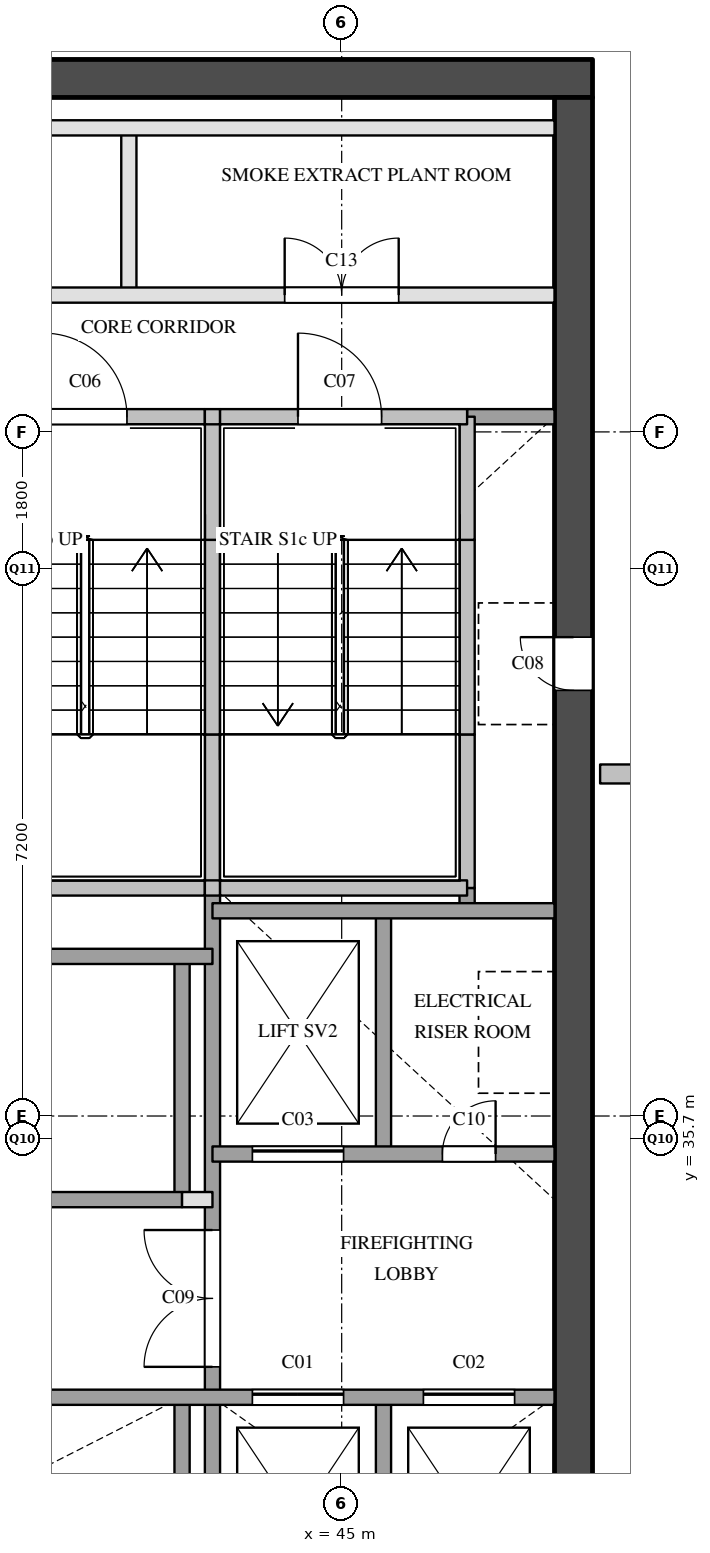
"""IFC4 building model, lengths in metres.
Left out: names, types, materials, properties, quantities, classifications, styles, units other than length and angle.
Written with IfcOpenShell. Run it as: python <this file> out.ifc"""

import sys

from ifc_helpers import new_model, si_unit, direction, frame, frame_2d, origin, place, context, subcontext, project, spatial, rectangle, extrude, element, fill, save


model = new_model("IFC4")
c1 = context("Model", 3, precision=1e-05, world=origin(), true_north=direction((0.0, 1.0)))
c2 = subcontext(c1, "Body", "Model", "MODEL_VIEW")
j1 = project(units=[si_unit("LENGTHUNIT", "METRE"), si_unit("PLANEANGLEUNIT", "RADIAN")], contexts=[c1])
p1 = place(None, origin())
s1 = spatial("IfcSite", under=j1, at=p1, CompositionType="ELEMENT")
p2 = place(p1, origin())
s2 = spatial("IfcBuilding", under=s1, at=p2, CompositionType="ELEMENT")
p3 = place(p2, frame((0.0, 0.0, 197.3)))
s3 = spatial("IfcBuildingStorey", under=s2, at=p3, CompositionType="ELEMENT", Elevation=197.3)
p4 = place(p3, frame((36.1, 49.65, 0.0), z_axis=(0.0, 0.0, 1.0), x_axis=(1.0, 0.0, 0.0)))
e1 = element("IfcWall", 1, at=p4, inside=s3, PredefinedType="SHEAR", context=c2, shape_type="SweptSolid", body=[
    extrude(rectangle(XDim=12.2, YDim=0.5, at=frame_2d((6.1, 0.0))), origin(), (0.0, 0.0, 1.0), 5.7),
])
p5 = place(p3, frame((48.05, 29.1, 0.0), z_axis=(0.0, 0.0, 1.0), x_axis=(0.0, 1.0, 0.0)))
e2 = element("IfcWall", 2, at=p5, inside=s3, PredefinedType="SHEAR", context=c2, shape_type="SweptSolid", body=[
    extrude(rectangle(XDim=20.3, YDim=0.5, at=frame_2d((10.15, 0.0))), origin(), (0.0, 0.0, 1.0), 5.7),
])
p6 = place(p5, frame((12.5, 0.0, 0.0)))
e3 = element("IfcOpeningElement", 3, at=p6, cuts=e2, PredefinedType="OPENING", context=c2, shape_type="SweptSolid", body=[
    extrude(rectangle(XDim=0.7, YDim=2.1, at=frame_2d((0.35, 1.05))), frame((0.0, 0.26, 0.0), z_axis=(0.0, -1.0, 0.0), x_axis=(1.0, 0.0, 0.0)), (0.0, 0.0, 1.0), 0.52),
])
p7 = place(p3, frame((42.2, 46.8, 0.0), z_axis=(0.0, 0.0, 1.0), x_axis=(0.0, 1.0, 0.0)))
e4 = element("IfcWall", 4, at=p7, inside=s3, PredefinedType="PARTITIONING", context=c2, shape_type="SweptSolid", body=[
    extrude(rectangle(XDim=2.2, YDim=0.2, at=frame_2d((1.1, 0.0))), origin(), (0.0, 0.0, 1.0), 5.7),
])
p8 = place(p3, frame((42.9, 29.1, 0.0), z_axis=(0.0, 0.0, 1.0), x_axis=(0.0, 1.0, 0.0)))
e5 = element("IfcWall", 5, at=p8, inside=s3, PredefinedType="SOLIDWALL", context=c2, shape_type="SweptSolid", body=[
    extrude(rectangle(XDim=3.2, YDim=0.2, at=frame_2d((1.6, 0.0))), origin(), (0.0, 0.0, 1.0), 5.7),
])
p9 = place(p3, frame((42.9, 34.9, 0.0), z_axis=(0.0, 0.0, 1.0), x_axis=(0.0, 1.0, 0.0)))
e6 = element("IfcWall", 6, at=p9, inside=s3, PredefinedType="SOLIDWALL", context=c2, shape_type="SweptSolid", body=[
    extrude(rectangle(XDim=3.2, YDim=0.2, at=frame_2d((1.6, 0.0))), origin(), (0.0, 0.0, 1.0), 5.7),
])
p10 = place(p3, frame((43.3, 29.1, 0.0), z_axis=(0.0, 0.0, 1.0), x_axis=(0.0, 1.0, 0.0)))
e7 = element("IfcWall", 7, at=p10, inside=s3, PredefinedType="SOLIDWALL", context=c2, shape_type="SweptSolid", body=[
    extrude(rectangle(XDim=9.9, YDim=0.2, at=frame_2d((4.95, 0.0))), origin(), (0.0, 0.0, 1.0), 5.7),
])
p11 = place(p10, frame((3.6, 0.0, 0.0)))
e8 = element("IfcOpeningElement", 8, at=p11, cuts=e7, PredefinedType="OPENING", context=c2, shape_type="SweptSolid", body=[
    extrude(rectangle(XDim=1.8, YDim=2.1, at=frame_2d((0.9, 1.05))), frame((0.0, 0.11, 0.0), z_axis=(0.0, -1.0, 0.0), x_axis=(1.0, 0.0, 0.0)), (0.0, 0.0, 1.0), 0.22),
])
p12 = place(p3, frame((43.3, 39.0, 0.0), z_axis=(0.0, 0.0, 1.0), x_axis=(0.0, 1.0, 0.0)))
e9 = element("IfcWall", 9, at=p12, inside=s3, PredefinedType="SOLIDWALL", context=c2, shape_type="SweptSolid", body=[
    extrude(rectangle(XDim=2.02, YDim=0.2, at=frame_2d((1.01, 0.0))), origin(), (0.0, 0.0, 1.0), 5.7),
])
p13 = place(p3, frame((43.3, 41.02, 0.0), z_axis=(0.0, 0.0, 1.0), x_axis=(0.0, 1.0, 0.0)))
e10 = element("IfcWall", 10, at=p13, inside=s3, PredefinedType="SOLIDWALL", context=c2, shape_type="SweptSolid", body=[
    extrude(rectangle(XDim=2.56, YDim=0.2, at=frame_2d((1.28, 0.0))), origin(), (0.0, 0.0, 1.0), 5.7),
])
p14 = place(p3, frame((43.3, 43.58, 0.0), z_axis=(0.0, 0.0, 1.0), x_axis=(0.0, 1.0, 0.0)))
e11 = element("IfcWall", 11, at=p14, inside=s3, PredefinedType="SOLIDWALL", context=c2, shape_type="SweptSolid", body=[
    extrude(rectangle(XDim=1.62, YDim=0.2, at=frame_2d((0.81, 0.0))), origin(), (0.0, 0.0, 1.0), 5.7),
])
for number, where, z_axis, x_axis in (
    (12, (45.55, 29.1, 0.0), (0.0, 0.0, 1.0), (0.0, 1.0, 0.0)),
    (13, (45.55, 35.5, 0.0), (0.0, 0.0, 1.0), (0.0, 1.0, 0.0)),
):
    element("IfcWall", number, at=place(p3, frame(where, z_axis=z_axis, x_axis=x_axis)), inside=s3, PredefinedType="SOLIDWALL", context=c2, shape_type="SweptSolid", body=[
        extrude(rectangle(XDim=3.2, YDim=0.2, at=frame_2d((1.6, 0.0))), origin(), (0.0, 0.0, 1.0), 5.7),
    ])
p15 = place(p3, frame((46.65, 38.7, 0.0), z_axis=(0.0, 0.0, 1.0), x_axis=(0.0, 1.0, 0.0)))
e14 = element("IfcWall", 14, at=p15, inside=s3, PredefinedType="SOLIDWALL", context=c2, shape_type="SweptSolid", body=[
    extrude(rectangle(XDim=0.3, YDim=0.2, at=frame_2d((0.15, 0.0))), origin(), (0.0, 0.0, 1.0), 5.7),
])
p16 = place(p3, frame((46.65, 39.0, 0.0), z_axis=(0.0, 0.0, 1.0), x_axis=(0.0, 1.0, 0.0)))
e15 = element("IfcWall", 15, at=p16, inside=s3, PredefinedType="SOLIDWALL", context=c2, shape_type="SweptSolid", body=[
    extrude(rectangle(XDim=2.02, YDim=0.2, at=frame_2d((1.01, 0.0))), origin(), (0.0, 0.0, 1.0), 5.7),
])
p17 = place(p3, frame((46.65, 41.02, 0.0), z_axis=(0.0, 0.0, 1.0), x_axis=(0.0, 1.0, 0.0)))
e16 = element("IfcWall", 16, at=p17, inside=s3, PredefinedType="SOLIDWALL", context=c2, shape_type="SweptSolid", body=[
    extrude(rectangle(XDim=2.56, YDim=0.2, at=frame_2d((1.28, 0.0))), origin(), (0.0, 0.0, 1.0), 5.7),
])
p18 = place(p3, frame((46.65, 43.58, 0.0), z_axis=(0.0, 0.0, 1.0), x_axis=(0.0, 1.0, 0.0)))
e17 = element("IfcWall", 17, at=p18, inside=s3, PredefinedType="SOLIDWALL", context=c2, shape_type="SweptSolid", body=[
    extrude(rectangle(XDim=1.62, YDim=0.2, at=frame_2d((0.81, 0.0))), origin(), (0.0, 0.0, 1.0), 5.7),
])
p19 = place(p3, frame((36.6, 32.3, 0.0), z_axis=(0.0, 0.0, 1.0), x_axis=(1.0, 0.0, 0.0)))
e18 = element("IfcWall", 18, at=p19, inside=s3, PredefinedType="SOLIDWALL", context=c2, shape_type="SweptSolid", body=[
    extrude(rectangle(XDim=11.2, YDim=0.2, at=frame_2d((5.6, 0.0))), origin(), (0.0, 0.0, 1.0), 5.7),
])
p20 = place(p19, frame((7.225, 0.0, 0.0)))
e19 = element("IfcOpeningElement", 19, at=p20, cuts=e18, PredefinedType="OPENING", context=c2, shape_type="SweptSolid", body=[
    extrude(rectangle(XDim=1.2, YDim=2.1, at=frame_2d((0.6, 1.05))), frame((0.0, 0.11, 0.0), z_axis=(0.0, -1.0, 0.0), x_axis=(1.0, 0.0, 0.0)), (0.0, 0.0, 1.0), 0.22),
])
p21 = place(p19, frame((9.475, 0.0, 0.0)))
e20 = element("IfcOpeningElement", 20, at=p21, cuts=e18, PredefinedType="OPENING", context=c2, shape_type="SweptSolid", body=[
    extrude(rectangle(XDim=1.2, YDim=2.1, at=frame_2d((0.6, 1.05))), frame((0.0, 0.11, 0.0), z_axis=(0.0, -1.0, 0.0), x_axis=(1.0, 0.0, 0.0)), (0.0, 0.0, 1.0), 0.22),
])
p22 = place(p3, frame((42.9, 34.9, 0.0), z_axis=(0.0, 0.0, 1.0), x_axis=(1.0, 0.0, 0.0)))
e21 = element("IfcWall", 21, at=p22, inside=s3, PredefinedType="PARTITIONING", context=c2, shape_type="SweptSolid", body=[
    extrude(rectangle(XDim=0.4, YDim=0.2, at=frame_2d((0.2, 0.0))), origin(), (0.0, 0.0, 1.0), 5.7),
])
p23 = place(p3, frame((36.6, 34.9, 0.0), z_axis=(0.0, 0.0, 1.0), x_axis=(1.0, 0.0, 0.0)))
e22 = element("IfcWall", 22, at=p23, inside=s3, PredefinedType="SOLIDWALL", context=c2, shape_type="SweptSolid", body=[
    extrude(rectangle(XDim=6.3, YDim=0.2, at=frame_2d((3.15, 0.0))), origin(), (0.0, 0.0, 1.0), 5.7),
])
p24 = place(p3, frame((43.3, 35.5, 0.0), z_axis=(0.0, 0.0, 1.0), x_axis=(1.0, 0.0, 0.0)))
e23 = element("IfcWall", 23, at=p24, inside=s3, PredefinedType="SOLIDWALL", context=c2, shape_type="SweptSolid", body=[
    extrude(rectangle(XDim=4.5, YDim=0.2, at=frame_2d((2.25, 0.0))), origin(), (0.0, 0.0, 1.0), 5.7),
])
p25 = place(p24, frame((0.525, 0.0, 0.0)))
e24 = element("IfcOpeningElement", 24, at=p25, cuts=e23, PredefinedType="OPENING", context=c2, shape_type="SweptSolid", body=[
    extrude(rectangle(XDim=1.2, YDim=2.1, at=frame_2d((0.6, 1.05))), frame((0.0, 0.11, 0.0), z_axis=(0.0, -1.0, 0.0), x_axis=(1.0, 0.0, 0.0)), (0.0, 0.0, 1.0), 0.22),
])
p26 = place(p24, frame((3.025, 0.0, 0.0)))
e25 = element("IfcOpeningElement", 25, at=p26, cuts=e23, PredefinedType="OPENING", context=c2, shape_type="SweptSolid", body=[
    extrude(rectangle(XDim=0.7, YDim=2.1, at=frame_2d((0.35, 1.05))), frame((0.0, 0.11, 0.0), z_axis=(0.0, -1.0, 0.0), x_axis=(1.0, 0.0, 0.0)), (0.0, 0.0, 1.0), 0.22),
])
p27 = place(p3, frame((36.6, 38.1, 0.0), z_axis=(0.0, 0.0, 1.0), x_axis=(1.0, 0.0, 0.0)))
e26 = element("IfcWall", 26, at=p27, inside=s3, PredefinedType="SOLIDWALL", context=c2, shape_type="SweptSolid", body=[
    extrude(rectangle(XDim=6.7, YDim=0.2, at=frame_2d((3.35, 0.0))), origin(), (0.0, 0.0, 1.0), 5.7),
])
p28 = place(p3, frame((43.3, 38.7, 0.0), z_axis=(0.0, 0.0, 1.0), x_axis=(1.0, 0.0, 0.0)))
e27 = element("IfcWall", 27, at=p28, inside=s3, PredefinedType="SOLIDWALL", context=c2, shape_type="SweptSolid", body=[
    extrude(rectangle(XDim=4.5, YDim=0.2, at=frame_2d((2.25, 0.0))), origin(), (0.0, 0.0, 1.0), 5.7),
])
p29 = place(p3, frame((40.05, 39.0, 0.0), z_axis=(0.0, 0.0, 1.0), x_axis=(1.0, 0.0, 0.0)))
e28 = element("IfcWall", 28, at=p29, inside=s3, PredefinedType="SOLIDWALL", context=c2, shape_type="SweptSolid", body=[
    extrude(rectangle(XDim=3.15, YDim=0.2, at=frame_2d((1.575, 0.0))), origin(), (0.0, 0.0, 1.0), 5.7),
])
p30 = place(p3, frame((43.2, 39.0, 0.0), z_axis=(0.0, 0.0, 1.0), x_axis=(1.0, 0.0, 0.0)))
e29 = element("IfcWall", 29, at=p30, inside=s3, PredefinedType="SOLIDWALL", context=c2, shape_type="SweptSolid", body=[
    extrude(rectangle(XDim=0.2, YDim=0.2, at=frame_2d((0.1, 0.0))), origin(), (0.0, 0.0, 1.0), 5.7),
])
p31 = place(p3, frame((43.4, 39.0, 0.0), z_axis=(0.0, 0.0, 1.0), x_axis=(1.0, 0.0, 0.0)))
e30 = element("IfcWall", 30, at=p31, inside=s3, PredefinedType="SOLIDWALL", context=c2, shape_type="SweptSolid", body=[
    extrude(rectangle(XDim=3.25, YDim=0.2, at=frame_2d((1.625, 0.0))), origin(), (0.0, 0.0, 1.0), 5.7),
])
p32 = place(p3, frame((46.65, 45.2, 0.0), z_axis=(0.0, 0.0, 1.0), x_axis=(1.0, 0.0, 0.0)))
e31 = element("IfcWall", 31, at=p32, inside=s3, PredefinedType="SOLIDWALL", context=c2, shape_type="SweptSolid", body=[
    extrude(rectangle(XDim=1.15, YDim=0.2, at=frame_2d((0.575, 0.0))), origin(), (0.0, 0.0, 1.0), 5.7),
])
p33 = place(p3, frame((40.05, 45.2, 0.0), z_axis=(0.0, 0.0, 1.0), x_axis=(1.0, 0.0, 0.0)))
e32 = element("IfcWall", 32, at=p33, inside=s3, PredefinedType="SOLIDWALL", context=c2, shape_type="SweptSolid", body=[
    extrude(rectangle(XDim=3.15, YDim=0.2, at=frame_2d((1.575, 0.0))), origin(), (0.0, 0.0, 1.0), 5.7),
])
p34 = place(p33, frame((1.025, 0.0, 0.0)))
e33 = element("IfcOpeningElement", 33, at=p34, cuts=e32, PredefinedType="OPENING", context=c2, shape_type="SweptSolid", body=[
    extrude(rectangle(XDim=1.1, YDim=2.1, at=frame_2d((0.55, 1.05))), frame((0.0, 0.11, 0.0), z_axis=(0.0, -1.0, 0.0), x_axis=(1.0, 0.0, 0.0)), (0.0, 0.0, 1.0), 0.22),
])
p35 = place(p3, frame((43.2, 45.2, 0.0), z_axis=(0.0, 0.0, 1.0), x_axis=(1.0, 0.0, 0.0)))
e34 = element("IfcWall", 34, at=p35, inside=s3, PredefinedType="SOLIDWALL", context=c2, shape_type="SweptSolid", body=[
    extrude(rectangle(XDim=0.2, YDim=0.2, at=frame_2d((0.1, 0.0))), origin(), (0.0, 0.0, 1.0), 5.7),
])
p36 = place(p3, frame((43.4, 45.2, 0.0), z_axis=(0.0, 0.0, 1.0), x_axis=(1.0, 0.0, 0.0)))
e35 = element("IfcWall", 35, at=p36, inside=s3, PredefinedType="SOLIDWALL", context=c2, shape_type="SweptSolid", body=[
    extrude(rectangle(XDim=3.25, YDim=0.2, at=frame_2d((1.625, 0.0))), origin(), (0.0, 0.0, 1.0), 5.7),
])
p37 = place(p36, frame((1.025, 0.0, 0.0)))
e36 = element("IfcOpeningElement", 36, at=p37, cuts=e35, PredefinedType="OPENING", context=c2, shape_type="SweptSolid", body=[
    extrude(rectangle(XDim=1.1, YDim=2.1, at=frame_2d((0.55, 1.05))), frame((0.0, 0.11, 0.0), z_axis=(0.0, -1.0, 0.0), x_axis=(1.0, 0.0, 0.0)), (0.0, 0.0, 1.0), 0.22),
])
p38 = place(p3, frame((36.6, 46.8, 0.0), z_axis=(0.0, 0.0, 1.0), x_axis=(1.0, 0.0, 0.0)))
e37 = element("IfcWall", 37, at=p38, inside=s3, PredefinedType="PARTITIONING", context=c2, shape_type="SweptSolid", body=[
    extrude(rectangle(XDim=11.2, YDim=0.2, at=frame_2d((5.6, 0.0))), origin(), (0.0, 0.0, 1.0), 5.7),
])
p39 = place(p38, frame((2.05, 0.0, 0.0)))
e38 = element("IfcOpeningElement", 38, at=p39, cuts=e37, PredefinedType="OPENING", context=c2, shape_type="SweptSolid", body=[
    extrude(rectangle(XDim=1.5, YDim=2.1, at=frame_2d((0.75, 1.05))), frame((0.0, 0.11, 0.0), z_axis=(0.0, -1.0, 0.0), x_axis=(1.0, 0.0, 0.0)), (0.0, 0.0, 1.0), 0.22),
])
p40 = place(p38, frame((7.65, 0.0, 0.0)))
e39 = element("IfcOpeningElement", 39, at=p40, cuts=e37, PredefinedType="OPENING", context=c2, shape_type="SweptSolid", body=[
    extrude(rectangle(XDim=1.5, YDim=2.1, at=frame_2d((0.75, 1.05))), frame((0.0, 0.11, 0.0), z_axis=(0.0, -1.0, 0.0), x_axis=(1.0, 0.0, 0.0)), (0.0, 0.0, 1.0), 0.22),
])
p41 = place(p3, frame((36.6, 49.0, 0.0), z_axis=(0.0, 0.0, 1.0), x_axis=(1.0, 0.0, 0.0)))
e40 = element("IfcWall", 40, at=p41, inside=s3, PredefinedType="PARTITIONING", context=c2, shape_type="SweptSolid", body=[
    extrude(rectangle(XDim=11.2, YDim=0.2, at=frame_2d((5.6, 0.0))), origin(), (0.0, 0.0, 1.0), 5.7),
])
p42 = place(p3, frame((48.4, 40.5, 0.0), z_axis=(0.0, 0.0, 1.0), x_axis=(1.0, 0.0, 0.0)))
e41 = element("IfcWall", 41, at=p42, inside=s3, PredefinedType="PARTITIONING", context=c2, shape_type="SweptSolid", body=[
    extrude(rectangle(XDim=5.6, YDim=0.25, at=frame_2d((2.8, 0.0))), origin(), (0.0, 0.0, 1.0), 5.7),
])
p43 = place(p20, origin())
e42 = element("IfcDoor", 42, at=p43, inside=s3, OperationType="SLIDING_TO_LEFT", PredefinedType="DOOR", context=c2, shape_type="SweptSolid", body=[
    extrude(rectangle(XDim=1.2, YDim=2.1, at=frame_2d((0.6, 1.05))), frame((0.0, 0.025, 0.0), z_axis=(0.0, -1.0, 0.0), x_axis=(1.0, 0.0, 0.0)), (0.0, 0.0, 1.0), 0.05),
])
fill(e19, e42)
p44 = place(p21, origin())
e43 = element("IfcDoor", 43, at=p44, inside=s3, OperationType="SLIDING_TO_LEFT", PredefinedType="DOOR", context=c2, shape_type="SweptSolid", body=[
    extrude(rectangle(XDim=1.2, YDim=2.1, at=frame_2d((0.6, 1.05))), frame((0.0, 0.025, 0.0), z_axis=(0.0, -1.0, 0.0), x_axis=(1.0, 0.0, 0.0)), (0.0, 0.0, 1.0), 0.05),
])
fill(e20, e43)
p45 = place(p25, origin())
e44 = element("IfcDoor", 44, at=p45, inside=s3, OperationType="SLIDING_TO_LEFT", PredefinedType="DOOR", context=c2, shape_type="SweptSolid", body=[
    extrude(rectangle(XDim=1.2, YDim=2.1, at=frame_2d((0.6, 1.05))), frame((0.0, 0.025, 0.0), z_axis=(0.0, -1.0, 0.0), x_axis=(1.0, 0.0, 0.0)), (0.0, 0.0, 1.0), 0.05),
])
fill(e24, e44)
p46 = place(p34, origin())
e45 = element("IfcDoor", 45, at=p46, inside=s3, OperationType="SINGLE_SWING_LEFT", PredefinedType="DOOR", context=c2, shape_type="SweptSolid", body=[
    extrude(rectangle(XDim=1.1, YDim=2.1, at=frame_2d((0.55, 1.05))), frame((0.0, 0.025, 0.0), z_axis=(0.0, -1.0, 0.0), x_axis=(1.0, 0.0, 0.0)), (0.0, 0.0, 1.0), 0.05),
])
fill(e33, e45)
p47 = place(p37, origin())
e46 = element("IfcDoor", 46, at=p47, inside=s3, OperationType="SINGLE_SWING_LEFT", PredefinedType="DOOR", context=c2, shape_type="SweptSolid", body=[
    extrude(rectangle(XDim=1.1, YDim=2.1, at=frame_2d((0.55, 1.05))), frame((0.0, 0.025, 0.0), z_axis=(0.0, -1.0, 0.0), x_axis=(1.0, 0.0, 0.0)), (0.0, 0.0, 1.0), 0.05),
])
fill(e36, e46)
p48 = place(p6, origin())
e47 = element("IfcDoor", 47, at=p48, inside=s3, OperationType="SINGLE_SWING_RIGHT", PredefinedType="DOOR", context=c2, shape_type="SweptSolid", body=[
    extrude(rectangle(XDim=0.7, YDim=2.1, at=frame_2d((0.35, 1.05))), frame((0.0, 0.025, 0.0), z_axis=(0.0, -1.0, 0.0), x_axis=(1.0, 0.0, 0.0)), (0.0, 0.0, 1.0), 0.05),
])
fill(e3, e47)
p49 = place(p11, origin())
e48 = element("IfcDoor", 48, at=p49, inside=s3, OperationType="DOUBLE_DOOR_SINGLE_SWING", PredefinedType="DOOR", context=c2, shape_type="SweptSolid", body=[
    extrude(rectangle(XDim=1.8, YDim=2.1, at=frame_2d((0.9, 1.05))), frame((0.0, 0.025, 0.0), z_axis=(0.0, -1.0, 0.0), x_axis=(1.0, 0.0, 0.0)), (0.0, 0.0, 1.0), 0.05),
])
fill(e8, e48)
p50 = place(p26, origin())
e49 = element("IfcDoor", 49, at=p50, inside=s3, OperationType="SINGLE_SWING_RIGHT", PredefinedType="DOOR", context=c2, shape_type="SweptSolid", body=[
    extrude(rectangle(XDim=0.7, YDim=2.1, at=frame_2d((0.35, 1.05))), frame((0.0, 0.025, 0.0), z_axis=(0.0, -1.0, 0.0), x_axis=(1.0, 0.0, 0.0)), (0.0, 0.0, 1.0), 0.05),
])
fill(e25, e49)
p51 = place(p40, origin())
e50 = element("IfcDoor", 50, at=p51, inside=s3, OperationType="DOUBLE_DOOR_SINGLE_SWING", PredefinedType="DOOR", context=c2, shape_type="SweptSolid", body=[
    extrude(rectangle(XDim=1.5, YDim=2.1, at=frame_2d((0.75, 1.05))), frame((0.0, 0.025, 0.0), z_axis=(0.0, -1.0, 0.0), x_axis=(1.0, 0.0, 0.0)), (0.0, 0.0, 1.0), 0.05),
])
fill(e39, e50)
save(model, sys.argv[1])
